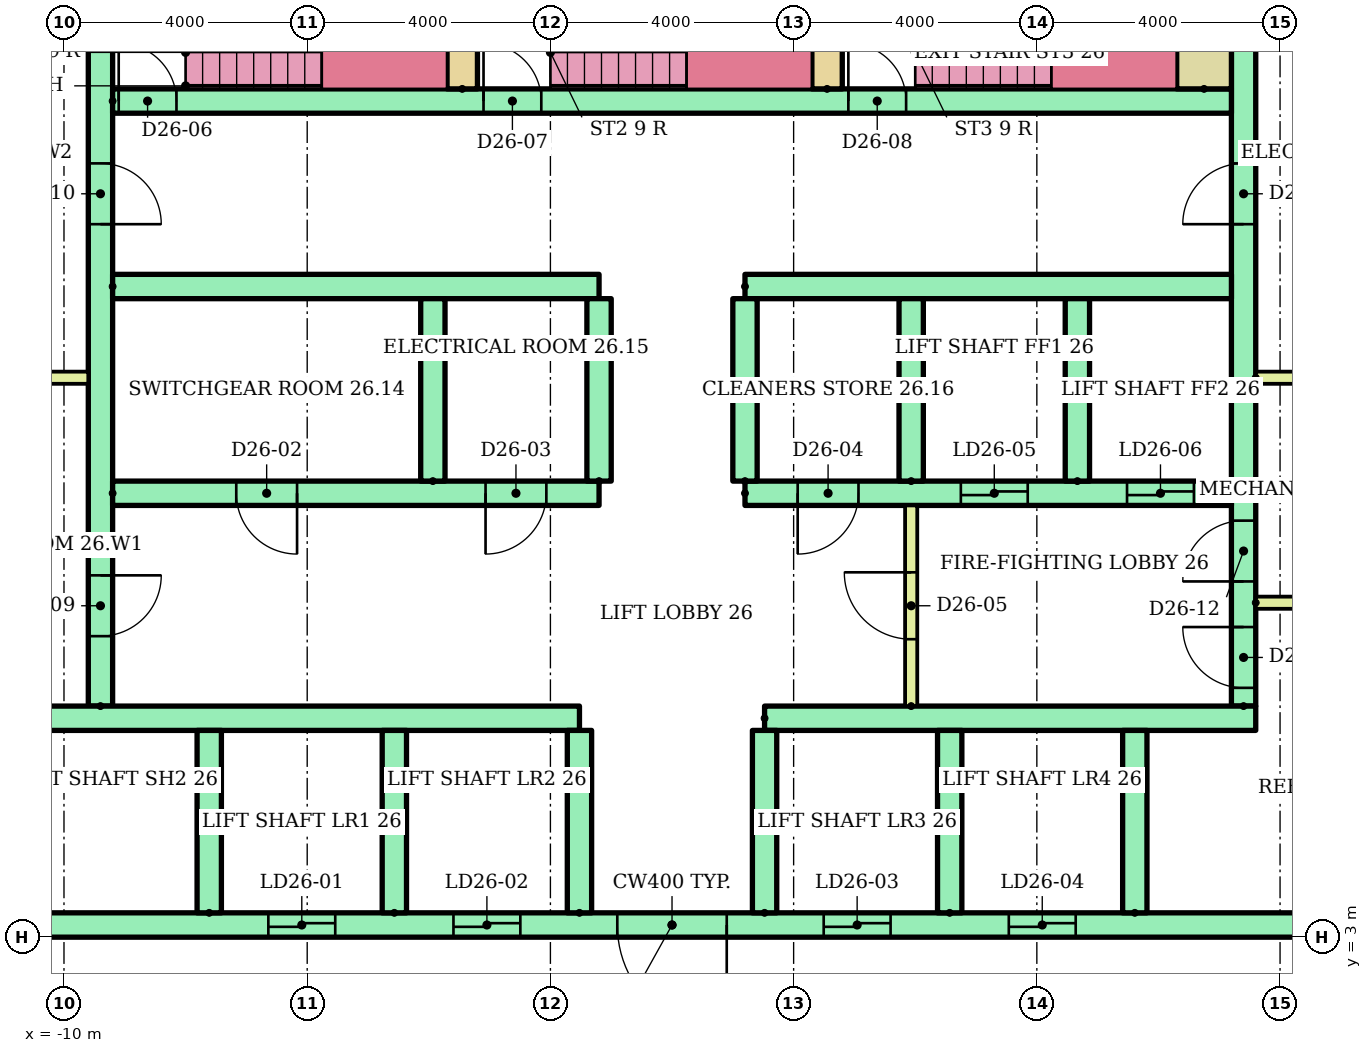
"""IFC4 building model, lengths in metres.
Left out: names, types, materials, properties, quantities, classifications, styles, units other than length and angle.
Written with IfcOpenShell. Run it as: python <this file> out.ifc"""

import sys

from ifc_helpers import new_model, si_unit, direction, frame, frame_2d, origin, place, context, subcontext, project, spatial, rectangle, extrude, element, fill, save


model = new_model("IFC4")
c1 = context("Model", 3, precision=1e-05, world=origin(), true_north=direction((0.0, 1.0)))
c2 = subcontext(c1, "Body", "Model", "MODEL_VIEW")
j1 = project(units=[si_unit("LENGTHUNIT", "METRE"), si_unit("PLANEANGLEUNIT", "RADIAN")], contexts=[c1])
p1 = place(None, origin())
s1 = spatial("IfcSite", under=j1, at=p1, CompositionType="ELEMENT")
p2 = place(p1, origin())
s2 = spatial("IfcBuilding", under=s1, at=p2, CompositionType="ELEMENT")
p3 = place(p2, frame((0.0, 0.0, 99.9)))
s3 = spatial("IfcBuildingStorey", under=s2, at=p3, CompositionType="ELEMENT", Elevation=99.9)
p4 = place(p3, frame((-9.4, 6.8, 0.0), z_axis=(0.0, 0.0, 1.0), x_axis=(0.0, 1.0, 0.0)))
e1 = element("IfcWall", 1, at=p4, inside=s3, PredefinedType="SHEAR", context=c2, shape_type="SweptSolid", body=[
    extrude(rectangle(XDim=12.7, YDim=0.4, at=frame_2d((6.35, 0.0))), origin(), (0.0, 0.0, 1.0), 2.92),
])
p5 = place(p4, frame((1.15, 0.0, 0.0)))
e2 = element("IfcOpeningElement", 2, at=p5, cuts=e1, PredefinedType="OPENING", context=c2, shape_type="SweptSolid", body=[
    extrude(rectangle(XDim=1.0, YDim=2.1, at=frame_2d((0.5, 1.05))), frame((0.0, 0.21, 0.0), z_axis=(0.0, -1.0, 0.0), x_axis=(1.0, 0.0, 0.0)), (0.0, 0.0, 1.0), 0.42),
])
p6 = place(p4, frame((7.925, 0.0, 0.0)))
e3 = element("IfcOpeningElement", 3, at=p6, cuts=e1, PredefinedType="OPENING", context=c2, shape_type="SweptSolid", body=[
    extrude(rectangle(XDim=1.0, YDim=2.1, at=frame_2d((0.5, 1.05))), frame((0.0, 0.21, 0.0), z_axis=(0.0, -1.0, 0.0), x_axis=(1.0, 0.0, 0.0)), (0.0, 0.0, 1.0), 0.42),
])
p7 = place(p3, frame((9.4, 6.8, 0.0), z_axis=(0.0, 0.0, 1.0), x_axis=(0.0, 1.0, 0.0)))
e4 = element("IfcWall", 4, at=p7, inside=s3, PredefinedType="SHEAR", context=c2, shape_type="SweptSolid", body=[
    extrude(rectangle(XDim=12.7, YDim=0.4, at=frame_2d((6.35, 0.0))), origin(), (0.0, 0.0, 1.0), 2.92),
])
p8 = place(p7, frame((0.3, 0.0, 0.0)))
e5 = element("IfcOpeningElement", 5, at=p8, cuts=e4, PredefinedType="OPENING", context=c2, shape_type="SweptSolid", body=[
    extrude(rectangle(XDim=1.0, YDim=2.1, at=frame_2d((0.5, 1.05))), frame((0.0, 0.21, 0.0), z_axis=(0.0, -1.0, 0.0), x_axis=(1.0, 0.0, 0.0)), (0.0, 0.0, 1.0), 0.42),
])
p9 = place(p7, frame((2.05, 0.0, 0.0)))
e6 = element("IfcOpeningElement", 6, at=p9, cuts=e4, PredefinedType="OPENING", context=c2, shape_type="SweptSolid", body=[
    extrude(rectangle(XDim=1.0, YDim=2.1, at=frame_2d((0.5, 1.05))), frame((0.0, 0.21, 0.0), z_axis=(0.0, -1.0, 0.0), x_axis=(1.0, 0.0, 0.0)), (0.0, 0.0, 1.0), 0.42),
])
p10 = place(p7, frame((7.925, 0.0, 0.0)))
e7 = element("IfcOpeningElement", 7, at=p10, cuts=e4, PredefinedType="OPENING", context=c2, shape_type="SweptSolid", body=[
    extrude(rectangle(XDim=1.0, YDim=2.1, at=frame_2d((0.5, 1.05))), frame((0.0, 0.21, 0.0), z_axis=(0.0, -1.0, 0.0), x_axis=(1.0, 0.0, 0.0)), (0.0, 0.0, 1.0), 0.42),
])
p11 = place(p3, frame((-13.5, 3.2, 0.0)))
e8 = element("IfcWall", 8, at=p11, inside=s3, PredefinedType="SHEAR", context=c2, shape_type="SweptSolid", body=[
    extrude(rectangle(XDim=27.0, YDim=0.4, at=frame_2d((13.5, 0.0))), origin(), (0.0, 0.0, 1.0), 2.92),
])
p12 = place(p11, frame((6.861, 0.0, 0.0)))
e9 = element("IfcOpeningElement", 9, at=p12, cuts=e8, PredefinedType="OPENING", context=c2, shape_type="SweptSolid", body=[
    extrude(rectangle(XDim=1.1, YDim=2.1, at=frame_2d((0.55, 1.05))), frame((0.0, 0.21, 0.0), z_axis=(0.0, -1.0, 0.0), x_axis=(1.0, 0.0, 0.0)), (0.0, 0.0, 1.0), 0.42),
])
p13 = place(p11, frame((9.906, 0.0, 0.0)))
e10 = element("IfcOpeningElement", 10, at=p13, cuts=e8, PredefinedType="OPENING", context=c2, shape_type="SweptSolid", body=[
    extrude(rectangle(XDim=1.1, YDim=2.1, at=frame_2d((0.55, 1.05))), frame((0.0, 0.21, 0.0), z_axis=(0.0, -1.0, 0.0), x_axis=(1.0, 0.0, 0.0)), (0.0, 0.0, 1.0), 0.42),
])
p14 = place(p11, frame((15.994, 0.0, 0.0)))
e11 = element("IfcOpeningElement", 11, at=p14, cuts=e8, PredefinedType="OPENING", context=c2, shape_type="SweptSolid", body=[
    extrude(rectangle(XDim=1.1, YDim=2.1, at=frame_2d((0.55, 1.05))), frame((0.0, 0.21, 0.0), z_axis=(0.0, -1.0, 0.0), x_axis=(1.0, 0.0, 0.0)), (0.0, 0.0, 1.0), 0.42),
])
p15 = place(p11, frame((19.039, 0.0, 0.0)))
e12 = element("IfcOpeningElement", 12, at=p15, cuts=e8, PredefinedType="OPENING", context=c2, shape_type="SweptSolid", body=[
    extrude(rectangle(XDim=1.1, YDim=2.1, at=frame_2d((0.55, 1.05))), frame((0.0, 0.21, 0.0), z_axis=(0.0, -1.0, 0.0), x_axis=(1.0, 0.0, 0.0)), (0.0, 0.0, 1.0), 0.42),
])
p16 = place(p11, frame((12.6, 0.0, 0.0)))
e13 = element("IfcOpeningElement", 13, at=p16, cuts=e8, PredefinedType="OPENING", context=c2, shape_type="SweptSolid", body=[
    extrude(rectangle(XDim=1.8, YDim=2.1, at=frame_2d((0.9, 1.05))), frame((0.0, 0.21, 0.0), z_axis=(0.0, -1.0, 0.0), x_axis=(1.0, 0.0, 0.0)), (0.0, 0.0, 1.0), 0.42),
])
p17 = place(p3, frame((-13.5, 6.6, 0.0)))
e14 = element("IfcWall", 14, at=p17, inside=s3, PredefinedType="SHEAR", context=c2, shape_type="SweptSolid", body=[
    extrude(rectangle(XDim=11.978, YDim=0.4, at=frame_2d((5.989, 0.0))), origin(), (0.0, 0.0, 1.0), 2.92),
])
p18 = place(p3, frame((1.522, 6.6, 0.0)))
e15 = element("IfcWall", 15, at=p18, inside=s3, PredefinedType="SHEAR", context=c2, shape_type="SweptSolid", body=[
    extrude(rectangle(XDim=8.078, YDim=0.4, at=frame_2d((4.039, 0.0))), origin(), (0.0, 0.0, 1.0), 2.92),
])
for number, where, z_axis, x_axis in (
    (16, (-7.611, 3.4, 0.0), (0.0, 0.0, 1.0), (0.0, 1.0, 0.0)),
    (17, (-4.567, 3.4, 0.0), (0.0, 0.0, 1.0), (0.0, 1.0, 0.0)),
    (18, (-1.522, 3.4, 0.0), (0.0, 0.0, 1.0), (0.0, 1.0, 0.0)),
    (19, (1.522, 3.4, 0.0), (0.0, 0.0, 1.0), (0.0, 1.0, 0.0)),
    (20, (4.567, 3.4, 0.0), (0.0, 0.0, 1.0), (0.0, 1.0, 0.0)),
    (21, (7.611, 3.4, 0.0), (0.0, 0.0, 1.0), (0.0, 1.0, 0.0)),
):
    element("IfcWall", number, at=place(p3, frame(where, z_axis=z_axis, x_axis=x_axis)), inside=s3, PredefinedType="SHEAR", context=c2, shape_type="SweptSolid", body=[
        extrude(rectangle(XDim=3.0, YDim=0.4, at=frame_2d((1.5, 0.0))), origin(), (0.0, 0.0, 1.0), 2.92),
    ])
p19 = place(p3, frame((-9.2, 10.3, 0.0)))
e22 = element("IfcWall", 22, at=p19, inside=s3, PredefinedType="SHEAR", context=c2, shape_type="SweptSolid", body=[
    extrude(rectangle(XDim=8.0, YDim=0.4, at=frame_2d((4.0, 0.0))), origin(), (0.0, 0.0, 1.0), 2.92),
])
p20 = place(p19, frame((2.033, 0.0, 0.0)))
e23 = element("IfcOpeningElement", 23, at=p20, cuts=e22, PredefinedType="OPENING", context=c2, shape_type="SweptSolid", body=[
    extrude(rectangle(XDim=1.0, YDim=2.1, at=frame_2d((0.5, 1.05))), frame((0.0, 0.21, 0.0), z_axis=(0.0, -1.0, 0.0), x_axis=(1.0, 0.0, 0.0)), (0.0, 0.0, 1.0), 0.42),
])
p21 = place(p19, frame((6.133, 0.0, 0.0)))
e24 = element("IfcOpeningElement", 24, at=p21, cuts=e22, PredefinedType="OPENING", context=c2, shape_type="SweptSolid", body=[
    extrude(rectangle(XDim=1.0, YDim=2.1, at=frame_2d((0.5, 1.05))), frame((0.0, 0.21, 0.0), z_axis=(0.0, -1.0, 0.0), x_axis=(1.0, 0.0, 0.0)), (0.0, 0.0, 1.0), 0.42),
])
p22 = place(p3, frame((-9.2, 13.7, 0.0)))
e25 = element("IfcWall", 25, at=p22, inside=s3, PredefinedType="SHEAR", context=c2, shape_type="SweptSolid", body=[
    extrude(rectangle(XDim=8.0, YDim=0.4, at=frame_2d((4.0, 0.0))), origin(), (0.0, 0.0, 1.0), 2.92),
])
p23 = place(p3, frame((1.2, 10.3, 0.0)))
e26 = element("IfcWall", 26, at=p23, inside=s3, PredefinedType="SHEAR", context=c2, shape_type="SweptSolid", body=[
    extrude(rectangle(XDim=8.0, YDim=0.4, at=frame_2d((4.0, 0.0))), origin(), (0.0, 0.0, 1.0), 2.92),
])
p24 = place(p23, frame((3.55, 0.0, 0.0)))
e27 = element("IfcOpeningElement", 27, at=p24, cuts=e26, PredefinedType="OPENING", context=c2, shape_type="SweptSolid", body=[
    extrude(rectangle(XDim=1.1, YDim=2.1, at=frame_2d((0.55, 1.05))), frame((0.0, 0.21, 0.0), z_axis=(0.0, -1.0, 0.0), x_axis=(1.0, 0.0, 0.0)), (0.0, 0.0, 1.0), 0.42),
])
p25 = place(p23, frame((6.283, 0.0, 0.0)))
e28 = element("IfcOpeningElement", 28, at=p25, cuts=e26, PredefinedType="OPENING", context=c2, shape_type="SweptSolid", body=[
    extrude(rectangle(XDim=1.1, YDim=2.1, at=frame_2d((0.55, 1.05))), frame((0.0, 0.21, 0.0), z_axis=(0.0, -1.0, 0.0), x_axis=(1.0, 0.0, 0.0)), (0.0, 0.0, 1.0), 0.42),
])
p26 = place(p23, frame((0.867, 0.0, 0.0)))
e29 = element("IfcOpeningElement", 29, at=p26, cuts=e26, PredefinedType="OPENING", context=c2, shape_type="SweptSolid", body=[
    extrude(rectangle(XDim=1.0, YDim=2.1, at=frame_2d((0.5, 1.05))), frame((0.0, 0.21, 0.0), z_axis=(0.0, -1.0, 0.0), x_axis=(1.0, 0.0, 0.0)), (0.0, 0.0, 1.0), 0.42),
])
p27 = place(p3, frame((1.2, 13.7, 0.0)))
e30 = element("IfcWall", 30, at=p27, inside=s3, PredefinedType="SHEAR", context=c2, shape_type="SweptSolid", body=[
    extrude(rectangle(XDim=8.0, YDim=0.4, at=frame_2d((4.0, 0.0))), origin(), (0.0, 0.0, 1.0), 2.92),
])
for number, where, z_axis, x_axis in (
    (31, (-3.933, 10.5, 0.0), (0.0, 0.0, 1.0), (0.0, 1.0, 0.0)),
    (32, (-1.2, 10.5, 0.0), (0.0, 0.0, 1.0), (0.0, 1.0, 0.0)),
    (33, (1.2, 10.5, 0.0), (0.0, 0.0, 1.0), (0.0, 1.0, 0.0)),
    (34, (3.933, 10.5, 0.0), (0.0, 0.0, 1.0), (0.0, 1.0, 0.0)),
    (35, (6.667, 10.5, 0.0), (0.0, 0.0, 1.0), (0.0, 1.0, 0.0)),
):
    element("IfcWall", number, at=place(p3, frame(where, z_axis=z_axis, x_axis=x_axis)), inside=s3, PredefinedType="SHEAR", context=c2, shape_type="SweptSolid", body=[
        extrude(rectangle(XDim=3.0, YDim=0.4, at=frame_2d((1.5, 0.0))), origin(), (0.0, 0.0, 1.0), 2.92),
    ])
p28 = place(p3, frame((3.933, 6.8, 0.0), z_axis=(0.0, 0.0, 1.0), x_axis=(0.0, 1.0, 0.0)))
e36 = element("IfcWall", 36, at=p28, inside=s3, PredefinedType="PARTITIONING", context=c2, shape_type="SweptSolid", body=[
    extrude(rectangle(XDim=3.3, YDim=0.2, at=frame_2d((1.65, 0.0))), origin(), (0.0, 0.0, 1.0), 2.92),
])
p29 = place(p28, frame((1.1, 0.0, 0.0)))
e37 = element("IfcOpeningElement", 37, at=p29, cuts=e36, PredefinedType="OPENING", context=c2, shape_type="SweptSolid", body=[
    extrude(rectangle(XDim=1.1, YDim=2.1, at=frame_2d((0.55, 1.05))), frame((0.0, 0.11, 0.0), z_axis=(0.0, -1.0, 0.0), x_axis=(1.0, 0.0, 0.0)), (0.0, 0.0, 1.0), 0.22),
])
p30 = place(p3, frame((-9.2, 16.75, 0.0)))
e38 = element("IfcWall", 38, at=p30, inside=s3, PredefinedType="SHEAR", context=c2, shape_type="SweptSolid", body=[
    extrude(rectangle(XDim=18.4, YDim=0.4, at=frame_2d((9.2, 0.0))), origin(), (0.0, 0.0, 1.0), 2.92),
])
p31 = place(p30, frame((0.1, 0.0, 0.0)))
e39 = element("IfcOpeningElement", 39, at=p31, cuts=e38, PredefinedType="OPENING", context=c2, shape_type="SweptSolid", body=[
    extrude(rectangle(XDim=0.95, YDim=2.1, at=frame_2d((0.475, 1.05))), frame((0.0, 0.21, 0.0), z_axis=(0.0, -1.0, 0.0), x_axis=(1.0, 0.0, 0.0)), (0.0, 0.0, 1.0), 0.42),
])
p32 = place(p30, frame((6.1, 0.0, 0.0)))
e40 = element("IfcOpeningElement", 40, at=p32, cuts=e38, PredefinedType="OPENING", context=c2, shape_type="SweptSolid", body=[
    extrude(rectangle(XDim=0.95, YDim=2.1, at=frame_2d((0.475, 1.05))), frame((0.0, 0.21, 0.0), z_axis=(0.0, -1.0, 0.0), x_axis=(1.0, 0.0, 0.0)), (0.0, 0.0, 1.0), 0.42),
])
p33 = place(p30, frame((12.1, 0.0, 0.0)))
e41 = element("IfcOpeningElement", 41, at=p33, cuts=e38, PredefinedType="OPENING", context=c2, shape_type="SweptSolid", body=[
    extrude(rectangle(XDim=0.95, YDim=2.1, at=frame_2d((0.475, 1.05))), frame((0.0, 0.21, 0.0), z_axis=(0.0, -1.0, 0.0), x_axis=(1.0, 0.0, 0.0)), (0.0, 0.0, 1.0), 0.42),
])
for number, where, z_axis, x_axis in (
    (42, (-3.45, 16.95, 0.0), (0.0, 0.0, 1.0), (0.0, 1.0, 0.0)),
    (43, (2.55, 16.95, 0.0), (0.0, 0.0, 1.0), (0.0, 1.0, 0.0)),
):
    element("IfcWall", number, at=place(p3, frame(where, z_axis=z_axis, x_axis=x_axis)), inside=s3, PredefinedType="SHEAR", context=c2, shape_type="SweptSolid", body=[
        extrude(rectangle(XDim=2.55, YDim=0.5, at=frame_2d((1.275, 0.0))), origin(), (0.0, 0.0, 1.0), 2.92),
    ])
p34 = place(p3, frame((8.75, 16.95, 0.0), z_axis=(0.0, 0.0, 1.0), x_axis=(0.0, 1.0, 0.0)))
e44 = element("IfcWall", 44, at=p34, inside=s3, PredefinedType="SHEAR", context=c2, shape_type="SweptSolid", body=[
    extrude(rectangle(XDim=2.55, YDim=0.9, at=frame_2d((1.275, 0.0))), origin(), (0.0, 0.0, 1.0), 2.92),
])
for number, where in (
    (45, (-13.5, 12.2, 0.0)),
    (46, (9.6, 8.5, 0.0)),
    (47, (9.6, 12.2, 0.0)),
):
    element("IfcWall", number, at=place(p3, frame(where)), inside=s3, PredefinedType="PARTITIONING", context=c2, shape_type="SweptSolid", body=[
        extrude(rectangle(XDim=3.9, YDim=0.2, at=frame_2d((1.95, 0.0))), origin(), (0.0, 0.0, 1.0), 2.92),
    ])
p35 = place(p12, origin())
e48 = element("IfcDoor", 48, at=p35, inside=s3, OperationType="SLIDING_TO_LEFT", PredefinedType="DOOR", context=c2, shape_type="SweptSolid", body=[
    extrude(rectangle(XDim=1.1, YDim=2.1, at=frame_2d((0.55, 1.05))), frame((0.0, 0.025, 0.0), z_axis=(0.0, -1.0, 0.0), x_axis=(1.0, 0.0, 0.0)), (0.0, 0.0, 1.0), 0.05),
])
fill(e9, e48)
p36 = place(p13, origin())
e49 = element("IfcDoor", 49, at=p36, inside=s3, OperationType="SLIDING_TO_LEFT", PredefinedType="DOOR", context=c2, shape_type="SweptSolid", body=[
    extrude(rectangle(XDim=1.1, YDim=2.1, at=frame_2d((0.55, 1.05))), frame((0.0, 0.025, 0.0), z_axis=(0.0, -1.0, 0.0), x_axis=(1.0, 0.0, 0.0)), (0.0, 0.0, 1.0), 0.05),
])
fill(e10, e49)
p37 = place(p14, origin())
e50 = element("IfcDoor", 50, at=p37, inside=s3, OperationType="SLIDING_TO_LEFT", PredefinedType="DOOR", context=c2, shape_type="SweptSolid", body=[
    extrude(rectangle(XDim=1.1, YDim=2.1, at=frame_2d((0.55, 1.05))), frame((0.0, 0.025, 0.0), z_axis=(0.0, -1.0, 0.0), x_axis=(1.0, 0.0, 0.0)), (0.0, 0.0, 1.0), 0.05),
])
fill(e11, e50)
p38 = place(p15, origin())
e51 = element("IfcDoor", 51, at=p38, inside=s3, OperationType="SLIDING_TO_LEFT", PredefinedType="DOOR", context=c2, shape_type="SweptSolid", body=[
    extrude(rectangle(XDim=1.1, YDim=2.1, at=frame_2d((0.55, 1.05))), frame((0.0, 0.025, 0.0), z_axis=(0.0, -1.0, 0.0), x_axis=(1.0, 0.0, 0.0)), (0.0, 0.0, 1.0), 0.05),
])
fill(e12, e51)
p39 = place(p16, frame((1.8, 0.0, 0.0), z_axis=(0.0, 0.0, 1.0), x_axis=(-1.0, 0.0, 0.0)))
e52 = element("IfcDoor", 52, at=p39, inside=s3, OperationType="DOUBLE_DOOR_SINGLE_SWING", PredefinedType="DOOR", context=c2, shape_type="SweptSolid", body=[
    extrude(rectangle(XDim=1.8, YDim=2.1, at=frame_2d((0.9, 1.05))), frame((0.0, 0.025, 0.0), z_axis=(0.0, -1.0, 0.0), x_axis=(1.0, 0.0, 0.0)), (0.0, 0.0, 1.0), 0.05),
])
fill(e13, e52)
p40 = place(p24, origin())
e53 = element("IfcDoor", 53, at=p40, inside=s3, OperationType="SLIDING_TO_LEFT", PredefinedType="DOOR", context=c2, shape_type="SweptSolid", body=[
    extrude(rectangle(XDim=1.1, YDim=2.1, at=frame_2d((0.55, 1.05))), frame((0.0, 0.025, 0.0), z_axis=(0.0, -1.0, 0.0), x_axis=(1.0, 0.0, 0.0)), (0.0, 0.0, 1.0), 0.05),
])
fill(e27, e53)
p41 = place(p25, origin())
e54 = element("IfcDoor", 54, at=p41, inside=s3, OperationType="SLIDING_TO_LEFT", PredefinedType="DOOR", context=c2, shape_type="SweptSolid", body=[
    extrude(rectangle(XDim=1.1, YDim=2.1, at=frame_2d((0.55, 1.05))), frame((0.0, 0.025, 0.0), z_axis=(0.0, -1.0, 0.0), x_axis=(1.0, 0.0, 0.0)), (0.0, 0.0, 1.0), 0.05),
])
fill(e28, e54)
p42 = place(p20, frame((1.0, 0.0, 0.0), z_axis=(0.0, 0.0, 1.0), x_axis=(-1.0, 0.0, 0.0)))
e55 = element("IfcDoor", 55, at=p42, inside=s3, OperationType="SINGLE_SWING_RIGHT", PredefinedType="DOOR", context=c2, shape_type="SweptSolid", body=[
    extrude(rectangle(XDim=1.0, YDim=2.1, at=frame_2d((0.5, 1.05))), frame((0.0, 0.025, 0.0), z_axis=(0.0, -1.0, 0.0), x_axis=(1.0, 0.0, 0.0)), (0.0, 0.0, 1.0), 0.05),
])
fill(e23, e55)
p43 = place(p21, frame((1.0, 0.0, 0.0), z_axis=(0.0, 0.0, 1.0), x_axis=(-1.0, 0.0, 0.0)))
e56 = element("IfcDoor", 56, at=p43, inside=s3, OperationType="SINGLE_SWING_LEFT", PredefinedType="DOOR", context=c2, shape_type="SweptSolid", body=[
    extrude(rectangle(XDim=1.0, YDim=2.1, at=frame_2d((0.5, 1.05))), frame((0.0, 0.025, 0.0), z_axis=(0.0, -1.0, 0.0), x_axis=(1.0, 0.0, 0.0)), (0.0, 0.0, 1.0), 0.05),
])
fill(e24, e56)
p44 = place(p26, frame((1.0, 0.0, 0.0), z_axis=(0.0, 0.0, 1.0), x_axis=(-1.0, 0.0, 0.0)))
e57 = element("IfcDoor", 57, at=p44, inside=s3, OperationType="SINGLE_SWING_LEFT", PredefinedType="DOOR", context=c2, shape_type="SweptSolid", body=[
    extrude(rectangle(XDim=1.0, YDim=2.1, at=frame_2d((0.5, 1.05))), frame((0.0, 0.025, 0.0), z_axis=(0.0, -1.0, 0.0), x_axis=(1.0, 0.0, 0.0)), (0.0, 0.0, 1.0), 0.05),
])
fill(e29, e57)
p45 = place(p29, origin())
e58 = element("IfcDoor", 58, at=p45, inside=s3, OperationType="SINGLE_SWING_RIGHT", PredefinedType="DOOR", context=c2, shape_type="SweptSolid", body=[
    extrude(rectangle(XDim=1.1, YDim=2.1, at=frame_2d((0.55, 1.05))), frame((0.0, 0.025, 0.0), z_axis=(0.0, -1.0, 0.0), x_axis=(1.0, 0.0, 0.0)), (0.0, 0.0, 1.0), 0.05),
])
fill(e37, e58)
p46 = place(p31, origin())
e59 = element("IfcDoor", 59, at=p46, inside=s3, OperationType="SINGLE_SWING_LEFT", PredefinedType="DOOR", context=c2, shape_type="SweptSolid", body=[
    extrude(rectangle(XDim=0.95, YDim=2.1, at=frame_2d((0.475, 1.05))), frame((0.0, 0.025, 0.0), z_axis=(0.0, -1.0, 0.0), x_axis=(1.0, 0.0, 0.0)), (0.0, 0.0, 1.0), 0.05),
])
fill(e39, e59)
p47 = place(p32, origin())
e60 = element("IfcDoor", 60, at=p47, inside=s3, OperationType="SINGLE_SWING_LEFT", PredefinedType="DOOR", context=c2, shape_type="SweptSolid", body=[
    extrude(rectangle(XDim=0.95, YDim=2.1, at=frame_2d((0.475, 1.05))), frame((0.0, 0.025, 0.0), z_axis=(0.0, -1.0, 0.0), x_axis=(1.0, 0.0, 0.0)), (0.0, 0.0, 1.0), 0.05),
])
fill(e40, e60)
p48 = place(p33, origin())
e61 = element("IfcDoor", 61, at=p48, inside=s3, OperationType="SINGLE_SWING_LEFT", PredefinedType="DOOR", context=c2, shape_type="SweptSolid", body=[
    extrude(rectangle(XDim=0.95, YDim=2.1, at=frame_2d((0.475, 1.05))), frame((0.0, 0.025, 0.0), z_axis=(0.0, -1.0, 0.0), x_axis=(1.0, 0.0, 0.0)), (0.0, 0.0, 1.0), 0.05),
])
fill(e41, e61)
p49 = place(p5, frame((1.0, 0.0, 0.0), z_axis=(0.0, 0.0, 1.0), x_axis=(-1.0, 0.0, 0.0)))
e62 = element("IfcDoor", 62, at=p49, inside=s3, OperationType="SINGLE_SWING_RIGHT", PredefinedType="DOOR", context=c2, shape_type="SweptSolid", body=[
    extrude(rectangle(XDim=1.0, YDim=2.1, at=frame_2d((0.5, 1.05))), frame((0.0, 0.025, 0.0), z_axis=(0.0, -1.0, 0.0), x_axis=(1.0, 0.0, 0.0)), (0.0, 0.0, 1.0), 0.05),
])
fill(e2, e62)
p50 = place(p6, frame((1.0, 0.0, 0.0), z_axis=(0.0, 0.0, 1.0), x_axis=(-1.0, 0.0, 0.0)))
e63 = element("IfcDoor", 63, at=p50, inside=s3, OperationType="SINGLE_SWING_LEFT", PredefinedType="DOOR", context=c2, shape_type="SweptSolid", body=[
    extrude(rectangle(XDim=1.0, YDim=2.1, at=frame_2d((0.5, 1.05))), frame((0.0, 0.025, 0.0), z_axis=(0.0, -1.0, 0.0), x_axis=(1.0, 0.0, 0.0)), (0.0, 0.0, 1.0), 0.05),
])
fill(e3, e63)
p51 = place(p8, origin())
e64 = element("IfcDoor", 64, at=p51, inside=s3, OperationType="SINGLE_SWING_RIGHT", PredefinedType="DOOR", context=c2, shape_type="SweptSolid", body=[
    extrude(rectangle(XDim=1.0, YDim=2.1, at=frame_2d((0.5, 1.05))), frame((0.0, 0.025, 0.0), z_axis=(0.0, -1.0, 0.0), x_axis=(1.0, 0.0, 0.0)), (0.0, 0.0, 1.0), 0.05),
])
fill(e5, e64)
p52 = place(p9, origin())
e65 = element("IfcDoor", 65, at=p52, inside=s3, OperationType="SINGLE_SWING_LEFT", PredefinedType="DOOR", context=c2, shape_type="SweptSolid", body=[
    extrude(rectangle(XDim=1.0, YDim=2.1, at=frame_2d((0.5, 1.05))), frame((0.0, 0.025, 0.0), z_axis=(0.0, -1.0, 0.0), x_axis=(1.0, 0.0, 0.0)), (0.0, 0.0, 1.0), 0.05),
])
fill(e6, e65)
p53 = place(p10, origin())
e66 = element("IfcDoor", 66, at=p53, inside=s3, OperationType="SINGLE_SWING_LEFT", PredefinedType="DOOR", context=c2, shape_type="SweptSolid", body=[
    extrude(rectangle(XDim=1.0, YDim=2.1, at=frame_2d((0.5, 1.05))), frame((0.0, 0.025, 0.0), z_axis=(0.0, -1.0, 0.0), x_axis=(1.0, 0.0, 0.0)), (0.0, 0.0, 1.0), 0.05),
])
fill(e7, e66)
save(model, sys.argv[1])
